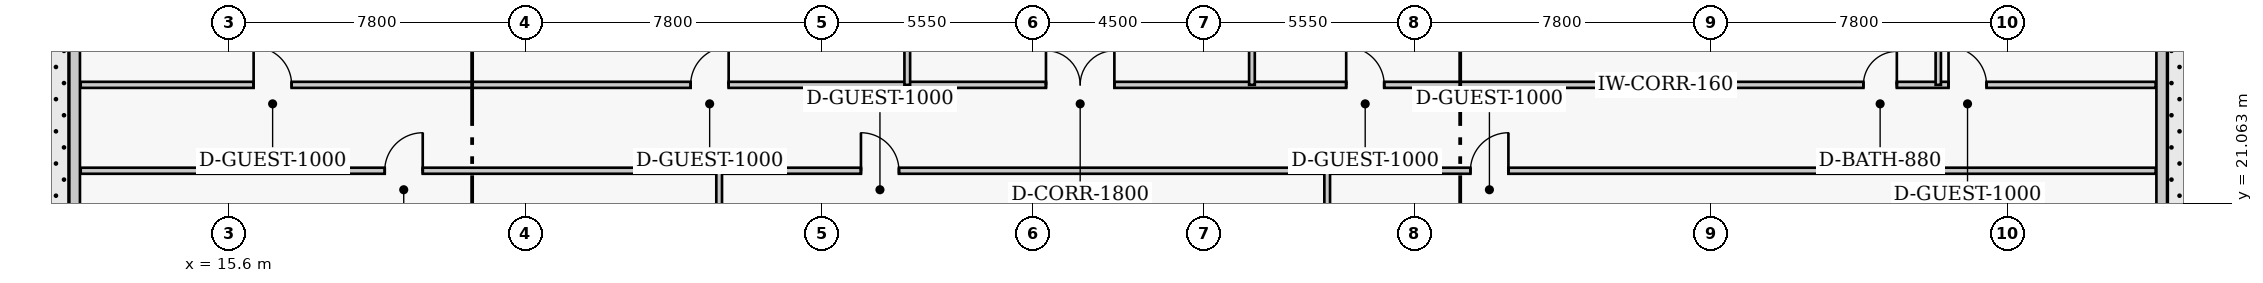
"""IFC4 building model, lengths in metres.
Left out: names, types, materials, properties, quantities, classifications, styles, units other than length and angle.
Written with IfcOpenShell. Run it as: python <this file> out.ifc"""

import sys

from ifc_helpers import new_model, si_unit, direction, frame, frame_2d, origin, place, context, subcontext, project, spatial, rectangle, extrude, element, fill, save


model = new_model("IFC4")
c1 = context("Model", 3, precision=1e-05, world=origin(), true_north=direction((0.0, 1.0)))
c2 = subcontext(c1, "Body", "Model", "MODEL_VIEW")
j1 = project(units=[si_unit("LENGTHUNIT", "METRE"), si_unit("PLANEANGLEUNIT", "RADIAN")], contexts=[c1])
p1 = place(None, origin())
s1 = spatial("IfcSite", under=j1, at=p1, CompositionType="ELEMENT")
p2 = place(p1, origin())
s2 = spatial("IfcBuilding", under=s1, at=p2, CompositionType="ELEMENT")
p3 = place(p2, frame((0.0, 0.0, 306.6)))
s3 = spatial("IfcBuildingStorey", under=s2, at=p3, CompositionType="ELEMENT", Elevation=306.6)
p4 = place(p3, frame((66.46, 15.76, 0.0), z_axis=(0.0, 0.0, 1.0), x_axis=(0.0, 1.0, 0.0)))
e1 = element("IfcWall", 1, at=p4, inside=s3, PredefinedType="SOLIDWALL", context=c2, shape_type="SweptSolid", body=[
    extrude(rectangle(XDim=25.68, YDim=0.28, at=frame_2d((12.84, 0.0))), origin(), (0.0, 0.0, 1.0), 4.45),
])
p5 = place(p4, frame((0.84, 0.0, 0.65)))
e2 = element("IfcOpeningElement", 2, at=p5, cuts=e1, PredefinedType="OPENING", context=c2, shape_type="SweptSolid", body=[
    extrude(rectangle(XDim=2.6, YDim=2.2, at=frame_2d((1.3, 1.1))), frame((0.0, 0.15, 0.0), z_axis=(0.0, -1.0, 0.0), x_axis=(1.0, 0.0, 0.0)), (0.0, 0.0, 1.0), 0.3),
])
p6 = place(p4, frame((9.4, 0.0, 0.65)))
e3 = element("IfcOpeningElement", 3, at=p6, cuts=e1, PredefinedType="OPENING", context=c2, shape_type="SweptSolid", body=[
    extrude(rectangle(XDim=2.6, YDim=2.2, at=frame_2d((1.3, 1.1))), frame((0.0, 0.15, 0.0), z_axis=(0.0, -1.0, 0.0), x_axis=(1.0, 0.0, 0.0)), (0.0, 0.0, 1.0), 0.3),
])
p7 = place(p4, frame((13.68, 0.0, 0.65)))
e4 = element("IfcOpeningElement", 4, at=p7, cuts=e1, PredefinedType="OPENING", context=c2, shape_type="SweptSolid", body=[
    extrude(rectangle(XDim=2.6, YDim=2.2, at=frame_2d((1.3, 1.1))), frame((0.0, 0.15, 0.0), z_axis=(0.0, -1.0, 0.0), x_axis=(1.0, 0.0, 0.0)), (0.0, 0.0, 1.0), 0.3),
])
p8 = place(p4, frame((17.96, 0.0, 0.65)))
e5 = element("IfcOpeningElement", 5, at=p8, cuts=e1, PredefinedType="OPENING", context=c2, shape_type="SweptSolid", body=[
    extrude(rectangle(XDim=2.6, YDim=2.2, at=frame_2d((1.3, 1.1))), frame((0.0, 0.15, 0.0), z_axis=(0.0, -1.0, 0.0), x_axis=(1.0, 0.0, 0.0)), (0.0, 0.0, 1.0), 0.3),
])
p9 = place(p4, frame((22.24, 0.0, 0.65)))
e6 = element("IfcOpeningElement", 6, at=p9, cuts=e1, PredefinedType="OPENING", context=c2, shape_type="SweptSolid", body=[
    extrude(rectangle(XDim=2.6, YDim=2.2, at=frame_2d((1.3, 1.1))), frame((0.0, 0.15, 0.0), z_axis=(0.0, -1.0, 0.0), x_axis=(1.0, 0.0, 0.0)), (0.0, 0.0, 1.0), 0.3),
])
p10 = place(p3, frame((11.54, 38.44, 0.0), z_axis=(0.0, 0.0, 1.0), x_axis=(0.0, -1.0, 0.0)))
e7 = element("IfcWall", 7, at=p10, inside=s3, PredefinedType="SOLIDWALL", context=c2, shape_type="SweptSolid", body=[
    extrude(rectangle(XDim=25.68, YDim=0.28, at=frame_2d((12.84, 0.0))), origin(), (0.0, 0.0, 1.0), 4.45),
])
p11 = place(p10, frame((0.84, 0.0, 0.65)))
e8 = element("IfcOpeningElement", 8, at=p11, cuts=e7, PredefinedType="OPENING", context=c2, shape_type="SweptSolid", body=[
    extrude(rectangle(XDim=2.6, YDim=2.2, at=frame_2d((1.3, 1.1))), frame((0.0, 0.15, 0.0), z_axis=(0.0, -1.0, 0.0), x_axis=(1.0, 0.0, 0.0)), (0.0, 0.0, 1.0), 0.3),
])
p12 = place(p10, frame((5.12, 0.0, 0.65)))
e9 = element("IfcOpeningElement", 9, at=p12, cuts=e7, PredefinedType="OPENING", context=c2, shape_type="SweptSolid", body=[
    extrude(rectangle(XDim=2.6, YDim=2.2, at=frame_2d((1.3, 1.1))), frame((0.0, 0.15, 0.0), z_axis=(0.0, -1.0, 0.0), x_axis=(1.0, 0.0, 0.0)), (0.0, 0.0, 1.0), 0.3),
])
p13 = place(p10, frame((9.4, 0.0, 0.65)))
e10 = element("IfcOpeningElement", 10, at=p13, cuts=e7, PredefinedType="OPENING", context=c2, shape_type="SweptSolid", body=[
    extrude(rectangle(XDim=2.6, YDim=2.2, at=frame_2d((1.3, 1.1))), frame((0.0, 0.15, 0.0), z_axis=(0.0, -1.0, 0.0), x_axis=(1.0, 0.0, 0.0)), (0.0, 0.0, 1.0), 0.3),
])
p14 = place(p10, frame((17.96, 0.0, 0.65)))
e11 = element("IfcOpeningElement", 11, at=p14, cuts=e7, PredefinedType="OPENING", context=c2, shape_type="SweptSolid", body=[
    extrude(rectangle(XDim=2.6, YDim=2.2, at=frame_2d((1.3, 1.1))), frame((0.0, 0.15, 0.0), z_axis=(0.0, -1.0, 0.0), x_axis=(1.0, 0.0, 0.0)), (0.0, 0.0, 1.0), 0.3),
])
p15 = place(p10, frame((22.24, 0.0, 0.65)))
e12 = element("IfcOpeningElement", 12, at=p15, cuts=e7, PredefinedType="OPENING", context=c2, shape_type="SweptSolid", body=[
    extrude(rectangle(XDim=2.6, YDim=2.2, at=frame_2d((1.3, 1.1))), frame((0.0, 0.15, 0.0), z_axis=(0.0, -1.0, 0.0), x_axis=(1.0, 0.0, 0.0)), (0.0, 0.0, 1.0), 0.3),
])
p16 = place(p3, frame((11.7, 21.92, 0.0), z_axis=(0.0, 0.0, 1.0), x_axis=(1.0, 0.0, 0.0)))
e13 = element("IfcWall", 13, at=p16, inside=s3, PredefinedType="PARTITIONING", context=c2, shape_type="SweptSolid", body=[
    extrude(rectangle(XDim=54.6, YDim=0.16, at=frame_2d((27.3, 0.0))), origin(), (0.0, 0.0, 1.0), 4.45),
])
p17 = place(p16, frame((8.0, 0.0, 0.0)))
e14 = element("IfcOpeningElement", 14, at=p17, cuts=e13, PredefinedType="OPENING", context=c2, shape_type="SweptSolid", body=[
    extrude(rectangle(XDim=1.0, YDim=2.15, at=frame_2d((0.5, 1.075))), frame((0.0, 0.09, 0.0), z_axis=(0.0, -1.0, 0.0), x_axis=(1.0, 0.0, 0.0)), (0.0, 0.0, 1.0), 0.18),
])
p18 = place(p16, frame((20.531, 0.0, 0.0)))
e15 = element("IfcOpeningElement", 15, at=p18, cuts=e13, PredefinedType="OPENING", context=c2, shape_type="SweptSolid", body=[
    extrude(rectangle(XDim=1.0, YDim=2.15, at=frame_2d((0.5, 1.075))), frame((0.0, 0.09, 0.0), z_axis=(0.0, -1.0, 0.0), x_axis=(1.0, 0.0, 0.0)), (0.0, 0.0, 1.0), 0.18),
])
p19 = place(p16, frame((36.569, 0.0, 0.0)))
e16 = element("IfcOpeningElement", 16, at=p19, cuts=e13, PredefinedType="OPENING", context=c2, shape_type="SweptSolid", body=[
    extrude(rectangle(XDim=1.0, YDim=2.15, at=frame_2d((0.5, 1.075))), frame((0.0, 0.09, 0.0), z_axis=(0.0, -1.0, 0.0), x_axis=(1.0, 0.0, 0.0)), (0.0, 0.0, 1.0), 0.18),
])
p20 = place(p3, frame((11.7, 24.18, 0.0), z_axis=(0.0, 0.0, 1.0), x_axis=(1.0, 0.0, 0.0)))
e17 = element("IfcWall", 17, at=p20, inside=s3, PredefinedType="PARTITIONING", context=c2, shape_type="SweptSolid", body=[
    extrude(rectangle(XDim=54.6, YDim=0.16, at=frame_2d((27.3, 0.0))), origin(), (0.0, 0.0, 1.0), 4.45),
])
p21 = place(p20, frame((25.4, 0.0, 0.0)))
e18 = element("IfcOpeningElement", 18, at=p21, cuts=e17, PredefinedType="OPENING", context=c2, shape_type="SweptSolid", body=[
    extrude(rectangle(XDim=1.8, YDim=2.2, at=frame_2d((0.9, 1.1))), frame((0.0, 0.09, 0.0), z_axis=(0.0, -1.0, 0.0), x_axis=(1.0, 0.0, 0.0)), (0.0, 0.0, 1.0), 0.18),
])
p22 = place(p20, frame((16.05, 0.0, 0.0)))
e19 = element("IfcOpeningElement", 19, at=p22, cuts=e17, PredefinedType="OPENING", context=c2, shape_type="SweptSolid", body=[
    extrude(rectangle(XDim=1.0, YDim=2.15, at=frame_2d((0.5, 1.075))), frame((0.0, 0.09, 0.0), z_axis=(0.0, -1.0, 0.0), x_axis=(1.0, 0.0, 0.0)), (0.0, 0.0, 1.0), 0.18),
])
p23 = place(p20, frame((33.3, 0.0, 0.0)))
e20 = element("IfcOpeningElement", 20, at=p23, cuts=e17, PredefinedType="OPENING", context=c2, shape_type="SweptSolid", body=[
    extrude(rectangle(XDim=1.0, YDim=2.15, at=frame_2d((0.5, 1.075))), frame((0.0, 0.09, 0.0), z_axis=(0.0, -1.0, 0.0), x_axis=(1.0, 0.0, 0.0)), (0.0, 0.0, 1.0), 0.18),
])
p24 = place(p20, frame((4.55, 0.0, 0.0)))
e21 = element("IfcOpeningElement", 21, at=p24, cuts=e17, PredefinedType="OPENING", context=c2, shape_type="SweptSolid", body=[
    extrude(rectangle(XDim=1.0, YDim=2.15, at=frame_2d((0.5, 1.075))), frame((0.0, 0.09, 0.0), z_axis=(0.0, -1.0, 0.0), x_axis=(1.0, 0.0, 0.0)), (0.0, 0.0, 1.0), 0.18),
])
p25 = place(p20, frame((46.91, 0.0, 0.0)))
e22 = element("IfcOpeningElement", 22, at=p25, cuts=e17, PredefinedType="OPENING", context=c2, shape_type="SweptSolid", body=[
    extrude(rectangle(XDim=0.88, YDim=2.05, at=frame_2d((0.44, 1.025))), frame((0.0, 0.09, 0.0), z_axis=(0.0, -1.0, 0.0), x_axis=(1.0, 0.0, 0.0)), (0.0, 0.0, 1.0), 0.18),
])
p26 = place(p20, frame((49.15, 0.0, 0.0)))
e23 = element("IfcOpeningElement", 23, at=p26, cuts=e17, PredefinedType="OPENING", context=c2, shape_type="SweptSolid", body=[
    extrude(rectangle(XDim=1.0, YDim=2.15, at=frame_2d((0.5, 1.075))), frame((0.0, 0.09, 0.0), z_axis=(0.0, -1.0, 0.0), x_axis=(1.0, 0.0, 0.0)), (0.0, 0.0, 1.0), 0.18),
])
for number, where, z_axis, x_axis in (
    (24, (33.45, 24.18, 0.0), (0.0, 0.0, 1.0), (0.0, 1.0, 0.0)),
    (25, (42.52, 24.18, 0.0), (0.0, 0.0, 1.0), (0.0, 1.0, 0.0)),
):
    element("IfcWall", number, at=place(p3, frame(where, z_axis=z_axis, x_axis=x_axis)), inside=s3, PredefinedType="PARTITIONING", context=c2, shape_type="SweptSolid", body=[
        extrude(rectangle(XDim=5.37, YDim=0.15, at=frame_2d((2.685, 0.0))), origin(), (0.0, 0.0, 1.0), 4.45),
    ])
p27 = place(p3, frame((28.5, 8.4, 0.0), z_axis=(0.0, 0.0, 1.0), x_axis=(0.0, 1.0, 0.0)))
e26 = element("IfcWall", 26, at=p27, inside=s3, PredefinedType="PARTITIONING", context=c2, shape_type="SweptSolid", body=[
    extrude(rectangle(XDim=13.52, YDim=0.15, at=frame_2d((6.76, 0.0))), origin(), (0.0, 0.0, 1.0), 4.45),
])
p28 = place(p3, frame((44.5, 9.92, 0.0), z_axis=(0.0, 0.0, 1.0), x_axis=(0.0, 1.0, 0.0)))
e27 = element("IfcWall", 27, at=p28, inside=s3, PredefinedType="PARTITIONING", context=c2, shape_type="SweptSolid", body=[
    extrude(rectangle(XDim=12.0, YDim=0.15, at=frame_2d((6.0, 0.0))), origin(), (0.0, 0.0, 1.0), 4.45),
])
p29 = place(p3, frame((60.58, 24.18, 0.0), z_axis=(0.0, 0.0, 1.0), x_axis=(0.0, 1.0, 0.0)))
e28 = element("IfcWall", 28, at=p29, inside=s3, PredefinedType="PLUMBINGWALL", context=c2, shape_type="SweptSolid", body=[
    extrude(rectangle(XDim=7.32, YDim=0.14, at=frame_2d((3.66, 0.0))), origin(), (0.0, 0.0, 1.0), 4.45),
])
p30 = place(p21, origin())
e29 = element("IfcDoor", 29, at=p30, inside=s3, OperationType="DOUBLE_DOOR_SINGLE_SWING", PredefinedType="DOOR", context=c2, shape_type="SweptSolid", body=[
    extrude(rectangle(XDim=1.8, YDim=2.2, at=frame_2d((0.9, 1.1))), frame((0.0, 0.025, 0.0), z_axis=(0.0, -1.0, 0.0), x_axis=(1.0, 0.0, 0.0)), (0.0, 0.0, 1.0), 0.05),
])
fill(e18, e29)
p31 = place(p22, origin())
e30 = element("IfcDoor", 30, at=p31, inside=s3, OperationType="SINGLE_SWING_RIGHT", PredefinedType="DOOR", context=c2, shape_type="SweptSolid", body=[
    extrude(rectangle(XDim=1.0, YDim=2.15, at=frame_2d((0.5, 1.075))), frame((0.0, 0.025, 0.0), z_axis=(0.0, -1.0, 0.0), x_axis=(1.0, 0.0, 0.0)), (0.0, 0.0, 1.0), 0.05),
])
fill(e19, e30)
p32 = place(p23, origin())
e31 = element("IfcDoor", 31, at=p32, inside=s3, OperationType="SINGLE_SWING_LEFT", PredefinedType="DOOR", context=c2, shape_type="SweptSolid", body=[
    extrude(rectangle(XDim=1.0, YDim=2.15, at=frame_2d((0.5, 1.075))), frame((0.0, 0.025, 0.0), z_axis=(0.0, -1.0, 0.0), x_axis=(1.0, 0.0, 0.0)), (0.0, 0.0, 1.0), 0.05),
])
fill(e20, e31)
p33 = place(p17, origin())
e32 = element("IfcDoor", 32, at=p33, inside=s3, OperationType="SINGLE_SWING_RIGHT", PredefinedType="DOOR", context=c2, shape_type="SweptSolid", body=[
    extrude(rectangle(XDim=1.0, YDim=2.15, at=frame_2d((0.5, 1.075))), frame((0.0, 0.025, 0.0), z_axis=(0.0, -1.0, 0.0), x_axis=(1.0, 0.0, 0.0)), (0.0, 0.0, 1.0), 0.05),
])
fill(e14, e32)
p34 = place(p18, origin())
e33 = element("IfcDoor", 33, at=p34, inside=s3, OperationType="SINGLE_SWING_LEFT", PredefinedType="DOOR", context=c2, shape_type="SweptSolid", body=[
    extrude(rectangle(XDim=1.0, YDim=2.15, at=frame_2d((0.5, 1.075))), frame((0.0, 0.025, 0.0), z_axis=(0.0, -1.0, 0.0), x_axis=(1.0, 0.0, 0.0)), (0.0, 0.0, 1.0), 0.05),
])
fill(e15, e33)
p35 = place(p19, origin())
e34 = element("IfcDoor", 34, at=p35, inside=s3, OperationType="SINGLE_SWING_RIGHT", PredefinedType="DOOR", context=c2, shape_type="SweptSolid", body=[
    extrude(rectangle(XDim=1.0, YDim=2.15, at=frame_2d((0.5, 1.075))), frame((0.0, 0.025, 0.0), z_axis=(0.0, -1.0, 0.0), x_axis=(1.0, 0.0, 0.0)), (0.0, 0.0, 1.0), 0.05),
])
fill(e16, e34)
p36 = place(p24, origin())
e35 = element("IfcDoor", 35, at=p36, inside=s3, OperationType="SINGLE_SWING_LEFT", PredefinedType="DOOR", context=c2, shape_type="SweptSolid", body=[
    extrude(rectangle(XDim=1.0, YDim=2.15, at=frame_2d((0.5, 1.075))), frame((0.0, 0.025, 0.0), z_axis=(0.0, -1.0, 0.0), x_axis=(1.0, 0.0, 0.0)), (0.0, 0.0, 1.0), 0.05),
])
fill(e21, e35)
p37 = place(p25, origin())
e36 = element("IfcDoor", 36, at=p37, inside=s3, OperationType="SINGLE_SWING_RIGHT", PredefinedType="DOOR", context=c2, shape_type="SweptSolid", body=[
    extrude(rectangle(XDim=0.88, YDim=2.05, at=frame_2d((0.44, 1.025))), frame((0.0, 0.025, 0.0), z_axis=(0.0, -1.0, 0.0), x_axis=(1.0, 0.0, 0.0)), (0.0, 0.0, 1.0), 0.05),
])
fill(e22, e36)
p38 = place(p26, origin())
e37 = element("IfcDoor", 37, at=p38, inside=s3, OperationType="SINGLE_SWING_LEFT", PredefinedType="DOOR", context=c2, shape_type="SweptSolid", body=[
    extrude(rectangle(XDim=1.0, YDim=2.15, at=frame_2d((0.5, 1.075))), frame((0.0, 0.025, 0.0), z_axis=(0.0, -1.0, 0.0), x_axis=(1.0, 0.0, 0.0)), (0.0, 0.0, 1.0), 0.05),
])
fill(e23, e37)
save(model, sys.argv[1])
